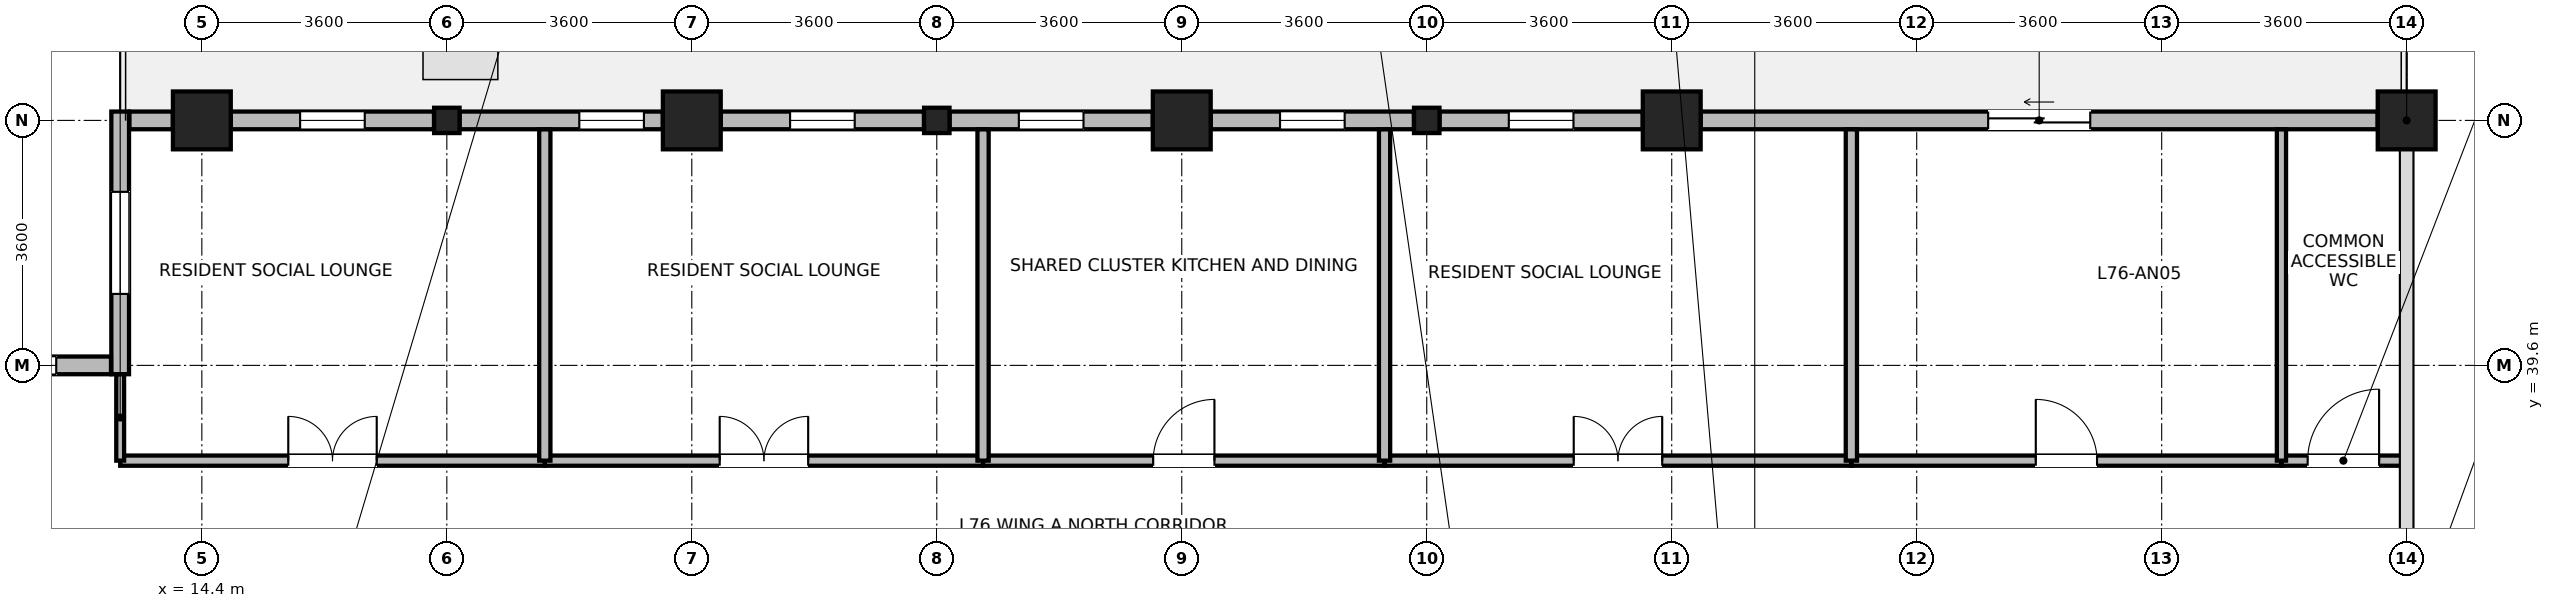
"""IFC4 building model, lengths in metres.
Left out: names, types, materials, properties, quantities, classifications, styles, units other than length and angle.
Written with IfcOpenShell. Run it as: python <this file> out.ifc"""

import sys

from ifc_helpers import new_model, si_unit, direction, frame, frame_2d, origin, origin_2d, place, context, subcontext, project, spatial, rectangle, i_section, extrude, source, transform, mapped, element, fill, save


model = new_model("IFC4")
c1 = context("Model", 3, precision=1e-05, world=origin(), true_north=direction((0.0, 1.0)))
c2 = subcontext(c1, "Body", "Model", "MODEL_VIEW")
j1 = project(units=[si_unit("LENGTHUNIT", "METRE"), si_unit("PLANEANGLEUNIT", "RADIAN")], contexts=[c1])
p1 = place(None, origin())
s1 = spatial("IfcSite", under=j1, at=p1, CompositionType="ELEMENT")
p2 = place(p1, origin())
s2 = spatial("IfcBuilding", under=s1, at=p2, CompositionType="ELEMENT")
p3 = place(p2, frame((0.0, 0.0, 294.3)))
s3 = spatial("IfcBuildingStorey", under=s2, at=p3, CompositionType="ELEMENT", Elevation=294.3)
m1 = source(origin(), c2, "Body", "SweptSolid", [
    extrude(rectangle(XDim=0.85, YDim=0.85, at=origin_2d()), origin(), (0.0, 0.0, 1.0), 3.7),
])
for number, where, z_axis, x_axis in (
    (1, (14.4, 43.2, 0.0), (0.0, 0.0, 1.0), (1.0, 0.0, 0.0)),
    (2, (21.6, 43.2, 0.0), (0.0, 0.0, 1.0), (1.0, 0.0, 0.0)),
    (3, (28.8, 43.2, 0.0), (0.0, 0.0, 1.0), (1.0, 0.0, 0.0)),
    (4, (36.0, 43.2, 0.0), (0.0, 0.0, 1.0), (1.0, 0.0, 0.0)),
    (5, (46.8, 43.2, 0.0), (0.0, 0.0, 1.0), (1.0, 0.0, 0.0)),
):
    element("IfcColumn", number, at=place(p3, frame(where, z_axis=z_axis, x_axis=x_axis)), inside=s3, PredefinedType="COLUMN", context=c2, shape_type="MappedRepresentation", body=[
        mapped(m1, transform((0.0, 0.0, 0.0), x_axis=(1.0, 0.0, 0.0), y_axis=(0.0, 1.0, 0.0), z_axis=(0.0, 0.0, 1.0), scale=1.0)),
    ])
m2 = source(origin(), c2, "Body", "SweptSolid", [
    extrude(i_section(OverallWidth=0.374, OverallDepth=0.372, WebThickness=0.015, FlangeThickness=0.026, FilletRadius=0.015, at=origin_2d()), origin(), (0.0, 0.0, 1.0), 3.7),
])
for number, where, z_axis, x_axis in (
    (6, (18.0, 43.2, 0.0), (0.0, 0.0, 1.0), (1.0, 0.0, 0.0)),
    (7, (25.2, 43.2, 0.0), (0.0, 0.0, 1.0), (1.0, 0.0, 0.0)),
    (8, (32.4, 43.2, 0.0), (0.0, 0.0, 1.0), (1.0, 0.0, 0.0)),
):
    element("IfcColumn", number, at=place(p3, frame(where, z_axis=z_axis, x_axis=x_axis)), inside=s3, PredefinedType="COLUMN", context=c2, shape_type="MappedRepresentation", body=[
        mapped(m2, transform((0.0, 0.0, 0.0), x_axis=(1.0, 0.0, 0.0), y_axis=(0.0, 1.0, 0.0), z_axis=(0.0, 0.0, 1.0), scale=1.0)),
    ])
p4 = place(p3, frame((36.426, 43.2, 0.0), z_axis=(0.0, 0.0, 1.0), x_axis=(1.0, 0.0, 0.0)))
e9 = element("IfcWall", 9, at=p4, inside=s3, PredefinedType="STANDARD", context=c2, shape_type="SweptSolid", body=[
    extrude(rectangle(XDim=9.948, YDim=0.26, at=frame_2d((4.974, 0.0))), origin(), (0.0, 0.0, 1.0), 2.98),
])
p5 = place(p4, frame((4.224, 0.0, 0.0)))
e10 = element("IfcOpeningElement", 10, at=p5, cuts=e9, PredefinedType="OPENING", context=c2, shape_type="SweptSolid", body=[
    extrude(rectangle(XDim=1.5, YDim=2.15, at=frame_2d((0.75, 1.075))), frame((0.0, 0.14, 0.0), z_axis=(0.0, -1.0, 0.0), x_axis=(1.0, 0.0, 0.0)), (0.0, 0.0, 1.0), 0.28),
])
p6 = place(p3, frame((32.588, 43.2, 0.0), z_axis=(0.0, 0.0, 1.0), x_axis=(1.0, 0.0, 0.0)))
e11 = element("IfcWall", 11, at=p6, inside=s3, PredefinedType="STANDARD", context=c2, shape_type="SweptSolid", body=[
    extrude(rectangle(XDim=2.986, YDim=0.26, at=frame_2d((1.493, 0.0))), origin(), (0.0, 0.0, 1.0), 2.98),
])
p7 = place(p6, frame((1.018, 0.0, 0.85)))
e12 = element("IfcOpeningElement", 12, at=p7, cuts=e11, PredefinedType="OPENING", context=c2, shape_type="SweptSolid", body=[
    extrude(rectangle(XDim=0.95, YDim=1.75, at=frame_2d((0.475, 0.875))), frame((0.0, 0.14, 0.0), z_axis=(0.0, -1.0, 0.0), x_axis=(1.0, 0.0, 0.0)), (0.0, 0.0, 1.0), 0.28),
])
p8 = place(p3, frame((29.226, 43.2, 0.0), z_axis=(0.0, 0.0, 1.0), x_axis=(1.0, 0.0, 0.0)))
e13 = element("IfcWall", 13, at=p8, inside=s3, PredefinedType="STANDARD", context=c2, shape_type="SweptSolid", body=[
    extrude(rectangle(XDim=2.986, YDim=0.26, at=frame_2d((1.493, 0.0))), origin(), (0.0, 0.0, 1.0), 2.98),
])
p9 = place(p8, frame((1.018, 0.0, 0.85)))
e14 = element("IfcOpeningElement", 14, at=p9, cuts=e13, PredefinedType="OPENING", context=c2, shape_type="SweptSolid", body=[
    extrude(rectangle(XDim=0.95, YDim=1.75, at=frame_2d((0.475, 0.875))), frame((0.0, 0.14, 0.0), z_axis=(0.0, -1.0, 0.0), x_axis=(1.0, 0.0, 0.0)), (0.0, 0.0, 1.0), 0.28),
])
p10 = place(p3, frame((25.388, 43.2, 0.0), z_axis=(0.0, 0.0, 1.0), x_axis=(1.0, 0.0, 0.0)))
e15 = element("IfcWall", 15, at=p10, inside=s3, PredefinedType="STANDARD", context=c2, shape_type="SweptSolid", body=[
    extrude(rectangle(XDim=2.986, YDim=0.26, at=frame_2d((1.493, 0.0))), origin(), (0.0, 0.0, 1.0), 2.98),
])
p11 = place(p10, frame((1.018, 0.0, 0.85)))
e16 = element("IfcOpeningElement", 16, at=p11, cuts=e15, PredefinedType="OPENING", context=c2, shape_type="SweptSolid", body=[
    extrude(rectangle(XDim=0.95, YDim=1.75, at=frame_2d((0.475, 0.875))), frame((0.0, 0.14, 0.0), z_axis=(0.0, -1.0, 0.0), x_axis=(1.0, 0.0, 0.0)), (0.0, 0.0, 1.0), 0.28),
])
p12 = place(p3, frame((22.026, 43.2, 0.0), z_axis=(0.0, 0.0, 1.0), x_axis=(1.0, 0.0, 0.0)))
e17 = element("IfcWall", 17, at=p12, inside=s3, PredefinedType="STANDARD", context=c2, shape_type="SweptSolid", body=[
    extrude(rectangle(XDim=2.986, YDim=0.26, at=frame_2d((1.493, 0.0))), origin(), (0.0, 0.0, 1.0), 2.98),
])
p13 = place(p12, frame((1.018, 0.0, 0.85)))
e18 = element("IfcOpeningElement", 18, at=p13, cuts=e17, PredefinedType="OPENING", context=c2, shape_type="SweptSolid", body=[
    extrude(rectangle(XDim=0.95, YDim=1.75, at=frame_2d((0.475, 0.875))), frame((0.0, 0.14, 0.0), z_axis=(0.0, -1.0, 0.0), x_axis=(1.0, 0.0, 0.0)), (0.0, 0.0, 1.0), 0.28),
])
p14 = place(p3, frame((18.188, 43.2, 0.0), z_axis=(0.0, 0.0, 1.0), x_axis=(1.0, 0.0, 0.0)))
e19 = element("IfcWall", 19, at=p14, inside=s3, PredefinedType="STANDARD", context=c2, shape_type="SweptSolid", body=[
    extrude(rectangle(XDim=2.986, YDim=0.26, at=frame_2d((1.493, 0.0))), origin(), (0.0, 0.0, 1.0), 2.98),
])
p15 = place(p14, frame((1.759, 0.0, 0.85)))
e20 = element("IfcOpeningElement", 20, at=p15, cuts=e19, PredefinedType="OPENING", context=c2, shape_type="SweptSolid", body=[
    extrude(rectangle(XDim=0.95, YDim=1.75, at=frame_2d((0.475, 0.875))), frame((0.0, 0.14, 0.0), z_axis=(0.0, -1.0, 0.0), x_axis=(1.0, 0.0, 0.0)), (0.0, 0.0, 1.0), 0.28),
])
p16 = place(p3, frame((14.826, 43.2, 0.0), z_axis=(0.0, 0.0, 1.0), x_axis=(1.0, 0.0, 0.0)))
e21 = element("IfcWall", 21, at=p16, inside=s3, PredefinedType="STANDARD", context=c2, shape_type="SweptSolid", body=[
    extrude(rectangle(XDim=2.986, YDim=0.26, at=frame_2d((1.493, 0.0))), origin(), (0.0, 0.0, 1.0), 2.98),
])
p17 = place(p16, frame((1.018, 0.0, 0.85)))
e22 = element("IfcOpeningElement", 22, at=p17, cuts=e21, PredefinedType="OPENING", context=c2, shape_type="SweptSolid", body=[
    extrude(rectangle(XDim=0.95, YDim=1.75, at=frame_2d((0.475, 0.875))), frame((0.0, 0.14, 0.0), z_axis=(0.0, -1.0, 0.0), x_axis=(1.0, 0.0, 0.0)), (0.0, 0.0, 1.0), 0.28),
])
p18 = place(p3, frame((13.335, 43.2, 0.0), z_axis=(0.0, 0.0, 1.0), x_axis=(1.0, 0.0, 0.0)))
e23 = element("IfcWall", 23, at=p18, inside=s3, PredefinedType="STANDARD", context=c2, shape_type="SweptSolid", body=[
    extrude(rectangle(XDim=0.639, YDim=0.26, at=frame_2d((0.32, 0.0))), origin(), (0.0, 0.0, 1.0), 3.38),
])
p19 = place(p3, frame((13.2, 39.47, 0.0), z_axis=(0.0, 0.0, 1.0), x_axis=(0.0, 1.0, 0.0)))
e24 = element("IfcWall", 24, at=p19, inside=s3, PredefinedType="STANDARD", context=c2, shape_type="SweptSolid", body=[
    extrude(rectangle(XDim=3.86, YDim=0.26, at=frame_2d((1.93, 0.0))), origin(), (0.0, 0.0, 1.0), 3.38),
])
p20 = place(p19, frame((1.18, 0.0, 0.85)))
e25 = element("IfcOpeningElement", 25, at=p20, cuts=e24, PredefinedType="OPENING", context=c2, shape_type="SweptSolid", body=[
    extrude(rectangle(XDim=1.5, YDim=1.85, at=frame_2d((0.75, 0.925))), frame((0.0, 0.14, 0.0), z_axis=(0.0, -1.0, 0.0), x_axis=(1.0, 0.0, 0.0)), (0.0, 0.0, 1.0), 0.28),
])
p21 = place(p3, frame((3.735, 39.6, 0.0), z_axis=(0.0, 0.0, 1.0), x_axis=(1.0, 0.0, 0.0)))
e26 = element("IfcWall", 26, at=p21, inside=s3, PredefinedType="STANDARD", context=c2, shape_type="SweptSolid", body=[
    extrude(rectangle(XDim=9.33, YDim=0.26, at=frame_2d((4.665, 0.0))), origin(), (0.0, 0.0, 1.0), 3.38),
])
p22 = place(p21, frame((0.805, 0.0, 0.85)))
e27 = element("IfcOpeningElement", 27, at=p22, cuts=e26, PredefinedType="OPENING", context=c2, shape_type="SweptSolid", body=[
    extrude(rectangle(XDim=1.5, YDim=1.85, at=frame_2d((0.75, 0.925))), frame((0.0, 0.14, 0.0), z_axis=(0.0, -1.0, 0.0), x_axis=(1.0, 0.0, 0.0)), (0.0, 0.0, 1.0), 0.28),
])
p23 = place(p21, frame((3.915, 0.0, 0.85)))
e28 = element("IfcOpeningElement", 28, at=p23, cuts=e26, PredefinedType="OPENING", context=c2, shape_type="SweptSolid", body=[
    extrude(rectangle(XDim=1.5, YDim=1.85, at=frame_2d((0.75, 0.925))), frame((0.0, 0.14, 0.0), z_axis=(0.0, -1.0, 0.0), x_axis=(1.0, 0.0, 0.0)), (0.0, 0.0, 1.0), 0.28),
])
p24 = place(p21, frame((7.025, 0.0, 0.85)))
e29 = element("IfcOpeningElement", 29, at=p24, cuts=e26, PredefinedType="OPENING", context=c2, shape_type="SweptSolid", body=[
    extrude(rectangle(XDim=1.5, YDim=1.85, at=frame_2d((0.75, 0.925))), frame((0.0, 0.14, 0.0), z_axis=(0.0, -1.0, 0.0), x_axis=(1.0, 0.0, 0.0)), (0.0, 0.0, 1.0), 0.28),
])
p25 = place(p3, frame((31.78, 38.2, 0.0), z_axis=(0.0, 0.0, 1.0), x_axis=(1.0, 0.0, 0.0)))
e30 = element("IfcWall", 30, at=p25, inside=s3, PredefinedType="PARTITIONING", context=c2, shape_type="SweptSolid", body=[
    extrude(rectangle(XDim=6.86, YDim=0.15, at=frame_2d((3.43, 0.0))), origin(), (0.0, 0.0, 1.0), 3.38),
])
p26 = place(p25, frame((2.78, 0.0, 0.0)))
e31 = element("IfcOpeningElement", 31, at=p26, cuts=e30, PredefinedType="OPENING", context=c2, shape_type="SweptSolid", body=[
    extrude(rectangle(XDim=1.3, YDim=2.12, at=frame_2d((0.65, 1.06))), frame((0.0, 0.085, 0.0), z_axis=(0.0, -1.0, 0.0), x_axis=(1.0, 0.0, 0.0)), (0.0, 0.0, 1.0), 0.17),
])
p27 = place(p3, frame((19.44, 38.2, 0.0), z_axis=(0.0, 0.0, 1.0), x_axis=(1.0, 0.0, 0.0)))
e32 = element("IfcWall", 32, at=p27, inside=s3, PredefinedType="PARTITIONING", context=c2, shape_type="SweptSolid", body=[
    extrude(rectangle(XDim=6.44, YDim=0.15, at=frame_2d((3.22, 0.0))), origin(), (0.0, 0.0, 1.0), 3.38),
])
p28 = place(p27, frame((2.57, 0.0, 0.0)))
e33 = element("IfcOpeningElement", 33, at=p28, cuts=e32, PredefinedType="OPENING", context=c2, shape_type="SweptSolid", body=[
    extrude(rectangle(XDim=1.3, YDim=2.12, at=frame_2d((0.65, 1.06))), frame((0.0, 0.085, 0.0), z_axis=(0.0, -1.0, 0.0), x_axis=(1.0, 0.0, 0.0)), (0.0, 0.0, 1.0), 0.17),
])
p29 = place(p3, frame((38.64, 38.2, 0.0), z_axis=(0.0, 0.0, 1.0), x_axis=(1.0, 0.0, 0.0)))
e34 = element("IfcWall", 34, at=p29, inside=s3, PredefinedType="PARTITIONING", context=c2, shape_type="SweptSolid", body=[
    extrude(rectangle(XDim=6.32, YDim=0.15, at=frame_2d((3.16, 0.0))), origin(), (0.0, 0.0, 1.0), 3.38),
])
p30 = place(p29, frame((2.71, 0.0, 0.0)))
e35 = element("IfcOpeningElement", 35, at=p30, cuts=e34, PredefinedType="OPENING", context=c2, shape_type="SweptSolid", body=[
    extrude(rectangle(XDim=0.9, YDim=2.08, at=frame_2d((0.45, 1.04))), frame((0.0, 0.085, 0.0), z_axis=(0.0, -1.0, 0.0), x_axis=(1.0, 0.0, 0.0)), (0.0, 0.0, 1.0), 0.17),
])
p31 = place(p3, frame((13.2, 38.2, 0.0), z_axis=(0.0, 0.0, 1.0), x_axis=(1.0, 0.0, 0.0)))
e36 = element("IfcWall", 36, at=p31, inside=s3, PredefinedType="PARTITIONING", context=c2, shape_type="SweptSolid", body=[
    extrude(rectangle(XDim=6.24, YDim=0.15, at=frame_2d((3.12, 0.0))), origin(), (0.0, 0.0, 1.0), 3.38),
])
p32 = place(p31, frame((2.47, 0.0, 0.0)))
e37 = element("IfcOpeningElement", 37, at=p32, cuts=e36, PredefinedType="OPENING", context=c2, shape_type="SweptSolid", body=[
    extrude(rectangle(XDim=1.3, YDim=2.12, at=frame_2d((0.65, 1.06))), frame((0.0, 0.085, 0.0), z_axis=(0.0, -1.0, 0.0), x_axis=(1.0, 0.0, 0.0)), (0.0, 0.0, 1.0), 0.17),
])
p33 = place(p3, frame((25.88, 38.2, 0.0), z_axis=(0.0, 0.0, 1.0), x_axis=(1.0, 0.0, 0.0)))
e38 = element("IfcWall", 38, at=p33, inside=s3, PredefinedType="PARTITIONING", context=c2, shape_type="SweptSolid", body=[
    extrude(rectangle(XDim=5.9, YDim=0.15, at=frame_2d((2.95, 0.0))), origin(), (0.0, 0.0, 1.0), 3.38),
])
p34 = place(p33, frame((2.5, 0.0, 0.0)))
e39 = element("IfcOpeningElement", 39, at=p34, cuts=e38, PredefinedType="OPENING", context=c2, shape_type="SweptSolid", body=[
    extrude(rectangle(XDim=0.9, YDim=2.08, at=frame_2d((0.45, 1.04))), frame((0.0, 0.085, 0.0), z_axis=(0.0, -1.0, 0.0), x_axis=(1.0, 0.0, 0.0)), (0.0, 0.0, 1.0), 0.17),
])
p35 = place(p3, frame((44.96, 38.2, 0.0), z_axis=(0.0, 0.0, 1.0), x_axis=(1.0, 0.0, 0.0)))
e40 = element("IfcWall", 40, at=p35, inside=s3, PredefinedType="PARTITIONING", context=c2, shape_type="SweptSolid", body=[
    extrude(rectangle(XDim=1.82, YDim=0.15, at=frame_2d((0.91, 0.0))), origin(), (0.0, 0.0, 1.0), 3.38),
])
p36 = place(p35, frame((0.385, 0.0, 0.0)))
e41 = element("IfcOpeningElement", 41, at=p36, cuts=e40, PredefinedType="OPENING", context=c2, shape_type="SweptSolid", body=[
    extrude(rectangle(XDim=1.05, YDim=2.12, at=frame_2d((0.525, 1.06))), frame((0.0, 0.085, 0.0), z_axis=(0.0, -1.0, 0.0), x_axis=(1.0, 0.0, 0.0)), (0.0, 0.0, 1.0), 0.17),
])
p37 = place(p3, frame((13.2, 38.2, 0.0), z_axis=(0.0, 0.0, 1.0), x_axis=(0.0, 1.0, 0.0)))
e42 = element("IfcWall", 42, at=p37, inside=s3, PredefinedType="PARTITIONING", context=c2, shape_type="SweptSolid", body=[
    extrude(rectangle(XDim=1.268, YDim=0.115, at=frame_2d((0.634, 0.0))), origin(), (0.0, 0.0, 1.0), 3.38),
])
for number, where, z_axis, x_axis in (
    (43, (19.44, 38.2, 0.0), (0.0, 0.0, 1.0), (0.0, 1.0, 0.0)),
    (44, (25.88, 38.2, 0.0), (0.0, 0.0, 1.0), (0.0, 1.0, 0.0)),
    (45, (31.78, 38.2, 0.0), (0.0, 0.0, 1.0), (0.0, 1.0, 0.0)),
    (46, (38.64, 38.2, 0.0), (0.0, 0.0, 1.0), (0.0, 1.0, 0.0)),
):
    element("IfcWall", number, at=place(p3, frame(where, z_axis=z_axis, x_axis=x_axis)), inside=s3, PredefinedType="PARTITIONING", context=c2, shape_type="SweptSolid", body=[
        extrude(rectangle(XDim=4.868, YDim=0.165, at=frame_2d((2.434, 0.0))), origin(), (0.0, 0.0, 1.0), 3.38),
    ])
p38 = place(p3, frame((44.96, 38.2, 0.0), z_axis=(0.0, 0.0, 1.0), x_axis=(0.0, 1.0, 0.0)))
e47 = element("IfcWall", 47, at=p38, inside=s3, PredefinedType="PARTITIONING", context=c2, shape_type="SweptSolid", body=[
    extrude(rectangle(XDim=4.868, YDim=0.135, at=frame_2d((2.434, 0.0))), origin(), (0.0, 0.0, 1.0), 3.38),
])
p39 = place(p5, origin())
e48 = element("IfcDoor", 48, at=p39, inside=s3, OperationType="SLIDING_TO_LEFT", PredefinedType="DOOR", context=c2, shape_type="SweptSolid", body=[
    extrude(rectangle(XDim=1.5, YDim=2.15, at=frame_2d((0.75, 1.075))), frame((0.0, 0.025, 0.0), z_axis=(0.0, -1.0, 0.0), x_axis=(1.0, 0.0, 0.0)), (0.0, 0.0, 1.0), 0.05),
])
fill(e10, e48)
p40 = place(p7, origin())
e49 = element("IfcWindow", 49, at=p40, inside=s3, PartitioningType="SINGLE_PANEL", PredefinedType="WINDOW", context=c2, shape_type="SweptSolid", body=[
    extrude(rectangle(XDim=0.95, YDim=1.75, at=frame_2d((0.475, 0.875))), frame((0.0, 0.03, 0.0), z_axis=(0.0, -1.0, 0.0), x_axis=(1.0, 0.0, 0.0)), (0.0, 0.0, 1.0), 0.06),
])
fill(e12, e49)
p41 = place(p9, origin())
e50 = element("IfcWindow", 50, at=p41, inside=s3, PartitioningType="SINGLE_PANEL", PredefinedType="WINDOW", context=c2, shape_type="SweptSolid", body=[
    extrude(rectangle(XDim=0.95, YDim=1.75, at=frame_2d((0.475, 0.875))), frame((0.0, 0.03, 0.0), z_axis=(0.0, -1.0, 0.0), x_axis=(1.0, 0.0, 0.0)), (0.0, 0.0, 1.0), 0.06),
])
fill(e14, e50)
p42 = place(p11, origin())
e51 = element("IfcWindow", 51, at=p42, inside=s3, PartitioningType="SINGLE_PANEL", PredefinedType="WINDOW", context=c2, shape_type="SweptSolid", body=[
    extrude(rectangle(XDim=0.95, YDim=1.75, at=frame_2d((0.475, 0.875))), frame((0.0, 0.03, 0.0), z_axis=(0.0, -1.0, 0.0), x_axis=(1.0, 0.0, 0.0)), (0.0, 0.0, 1.0), 0.06),
])
fill(e16, e51)
p43 = place(p13, origin())
e52 = element("IfcWindow", 52, at=p43, inside=s3, PartitioningType="SINGLE_PANEL", PredefinedType="WINDOW", context=c2, shape_type="SweptSolid", body=[
    extrude(rectangle(XDim=0.95, YDim=1.75, at=frame_2d((0.475, 0.875))), frame((0.0, 0.03, 0.0), z_axis=(0.0, -1.0, 0.0), x_axis=(1.0, 0.0, 0.0)), (0.0, 0.0, 1.0), 0.06),
])
fill(e18, e52)
p44 = place(p15, origin())
e53 = element("IfcWindow", 53, at=p44, inside=s3, PartitioningType="SINGLE_PANEL", PredefinedType="WINDOW", context=c2, shape_type="SweptSolid", body=[
    extrude(rectangle(XDim=0.95, YDim=1.75, at=frame_2d((0.475, 0.875))), frame((0.0, 0.03, 0.0), z_axis=(0.0, -1.0, 0.0), x_axis=(1.0, 0.0, 0.0)), (0.0, 0.0, 1.0), 0.06),
])
fill(e20, e53)
p45 = place(p17, origin())
e54 = element("IfcWindow", 54, at=p45, inside=s3, PartitioningType="SINGLE_PANEL", PredefinedType="WINDOW", context=c2, shape_type="SweptSolid", body=[
    extrude(rectangle(XDim=0.95, YDim=1.75, at=frame_2d((0.475, 0.875))), frame((0.0, 0.03, 0.0), z_axis=(0.0, -1.0, 0.0), x_axis=(1.0, 0.0, 0.0)), (0.0, 0.0, 1.0), 0.06),
])
fill(e22, e54)
p46 = place(p20, origin())
e55 = element("IfcWindow", 55, at=p46, inside=s3, PartitioningType="SINGLE_PANEL", PredefinedType="WINDOW", context=c2, shape_type="SweptSolid", body=[
    extrude(rectangle(XDim=1.5, YDim=1.85, at=frame_2d((0.75, 0.925))), frame((0.0, 0.03, 0.0), z_axis=(0.0, -1.0, 0.0), x_axis=(1.0, 0.0, 0.0)), (0.0, 0.0, 1.0), 0.06),
])
fill(e25, e55)
p47 = place(p24, origin())
e56 = element("IfcWindow", 56, at=p47, inside=s3, PartitioningType="SINGLE_PANEL", PredefinedType="WINDOW", context=c2, shape_type="SweptSolid", body=[
    extrude(rectangle(XDim=1.5, YDim=1.85, at=frame_2d((0.75, 0.925))), frame((0.0, 0.03, 0.0), z_axis=(0.0, -1.0, 0.0), x_axis=(1.0, 0.0, 0.0)), (0.0, 0.0, 1.0), 0.06),
])
fill(e29, e56)
p48 = place(p26, origin())
e57 = element("IfcDoor", 57, at=p48, inside=s3, OperationType="DOUBLE_DOOR_SINGLE_SWING", PredefinedType="DOOR", context=c2, shape_type="SweptSolid", body=[
    extrude(rectangle(XDim=1.3, YDim=2.12, at=frame_2d((0.65, 1.06))), frame((0.0, 0.025, 0.0), z_axis=(0.0, -1.0, 0.0), x_axis=(1.0, 0.0, 0.0)), (0.0, 0.0, 1.0), 0.05),
])
fill(e31, e57)
p49 = place(p28, origin())
e58 = element("IfcDoor", 58, at=p49, inside=s3, OperationType="DOUBLE_DOOR_SINGLE_SWING", PredefinedType="DOOR", context=c2, shape_type="SweptSolid", body=[
    extrude(rectangle(XDim=1.3, YDim=2.12, at=frame_2d((0.65, 1.06))), frame((0.0, 0.025, 0.0), z_axis=(0.0, -1.0, 0.0), x_axis=(1.0, 0.0, 0.0)), (0.0, 0.0, 1.0), 0.05),
])
fill(e33, e58)
p50 = place(p30, origin())
e59 = element("IfcDoor", 59, at=p50, inside=s3, OperationType="SINGLE_SWING_LEFT", PredefinedType="DOOR", context=c2, shape_type="SweptSolid", body=[
    extrude(rectangle(XDim=0.9, YDim=2.08, at=frame_2d((0.45, 1.04))), frame((0.0, 0.025, 0.0), z_axis=(0.0, -1.0, 0.0), x_axis=(1.0, 0.0, 0.0)), (0.0, 0.0, 1.0), 0.05),
])
fill(e35, e59)
p51 = place(p32, origin())
e60 = element("IfcDoor", 60, at=p51, inside=s3, OperationType="DOUBLE_DOOR_SINGLE_SWING", PredefinedType="DOOR", context=c2, shape_type="SweptSolid", body=[
    extrude(rectangle(XDim=1.3, YDim=2.12, at=frame_2d((0.65, 1.06))), frame((0.0, 0.025, 0.0), z_axis=(0.0, -1.0, 0.0), x_axis=(1.0, 0.0, 0.0)), (0.0, 0.0, 1.0), 0.05),
])
fill(e37, e60)
p52 = place(p34, origin())
e61 = element("IfcDoor", 61, at=p52, inside=s3, OperationType="SINGLE_SWING_RIGHT", PredefinedType="DOOR", context=c2, shape_type="SweptSolid", body=[
    extrude(rectangle(XDim=0.9, YDim=2.08, at=frame_2d((0.45, 1.04))), frame((0.0, 0.025, 0.0), z_axis=(0.0, -1.0, 0.0), x_axis=(1.0, 0.0, 0.0)), (0.0, 0.0, 1.0), 0.05),
])
fill(e39, e61)
p53 = place(p36, origin())
e62 = element("IfcDoor", 62, at=p53, inside=s3, OperationType="SINGLE_SWING_RIGHT", PredefinedType="DOOR", context=c2, shape_type="SweptSolid", body=[
    extrude(rectangle(XDim=1.05, YDim=2.12, at=frame_2d((0.525, 1.06))), frame((0.0, 0.025, 0.0), z_axis=(0.0, -1.0, 0.0), x_axis=(1.0, 0.0, 0.0)), (0.0, 0.0, 1.0), 0.05),
])
fill(e41, e62)
save(model, sys.argv[1])
